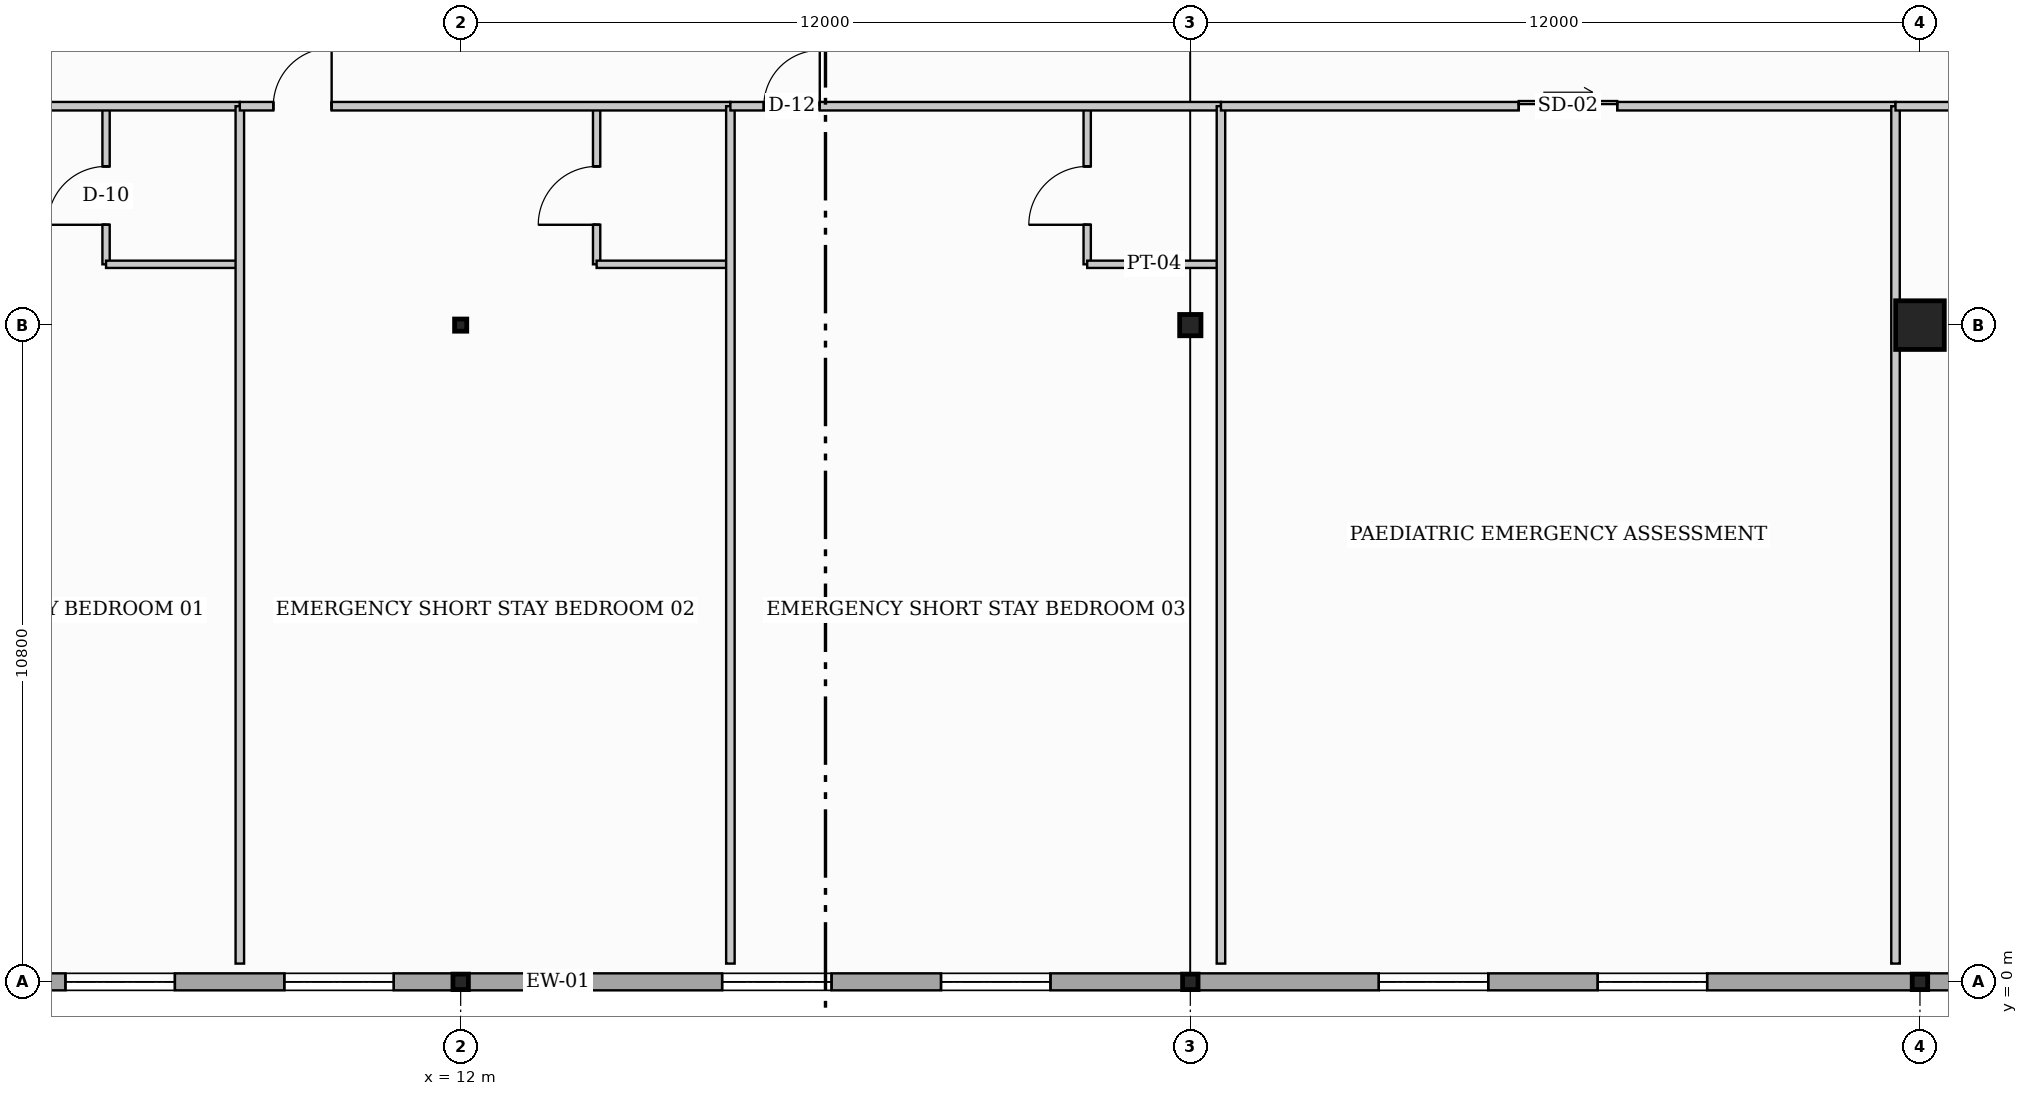
"""IFC4 building model, lengths in metres.
Left out: names, types, materials, properties, quantities, classifications, styles, units other than length and angle.
Written with IfcOpenShell. Run it as: python <this file> out.ifc"""

import sys

from ifc_helpers import new_model, si_unit, direction, frame, frame_2d, origin, origin_2d, place, context, subcontext, project, spatial, rectangle, hollow_rectangle, i_section, extrude, element, fill, save


model = new_model("IFC4")
c1 = context("Model", 3, precision=1e-05, world=origin(), true_north=direction((0.0, 1.0)))
c2 = subcontext(c1, "Body", "Model", "MODEL_VIEW")
j1 = project(units=[si_unit("LENGTHUNIT", "METRE"), si_unit("PLANEANGLEUNIT", "RADIAN")], contexts=[c1])
p1 = place(None, origin())
s1 = spatial("IfcSite", under=j1, at=p1, CompositionType="ELEMENT")
p2 = place(p1, origin())
s2 = spatial("IfcBuilding", under=s1, at=p2, CompositionType="ELEMENT")
p3 = place(p2, origin())
s3 = spatial("IfcBuildingStorey", under=s2, at=p3, CompositionType="ELEMENT", Elevation=0.0)
p4 = place(p3, frame((12.0, 0.0, 0.0), z_axis=(0.0, 0.0, 1.0), x_axis=(0.0, 1.0, 0.0)))
e1 = element("IfcColumn", 1, at=p4, inside=s3, PredefinedType="COLUMN", context=c2, shape_type="SweptSolid", body=[
    extrude(i_section(OverallWidth=0.254, OverallDepth=0.254, WebThickness=0.009, FlangeThickness=0.014, at=origin_2d()), origin(), (0.0, 0.0, 1.0), 4.8),
])
p5 = place(p3, frame((12.0, 10.8, 0.0), z_axis=(0.0, 0.0, 1.0), x_axis=(0.0, 1.0, 0.0)))
e2 = element("IfcColumn", 2, at=p5, inside=s3, PredefinedType="COLUMN", context=c2, shape_type="SweptSolid", body=[
    extrude(hollow_rectangle(XDim=0.2, YDim=0.2, WallThickness=0.01, at=origin_2d()), origin(), (0.0, 0.0, 1.0), 4.8),
])
p6 = place(p3, frame((24.0, 0.0, 0.0), z_axis=(0.0, 0.0, 1.0), x_axis=(1.0, 0.0, 0.0)))
e3 = element("IfcColumn", 3, at=p6, inside=s3, PredefinedType="COLUMN", context=c2, shape_type="SweptSolid", body=[
    extrude(i_section(OverallWidth=0.254, OverallDepth=0.254, WebThickness=0.009, FlangeThickness=0.014, at=origin_2d()), origin(), (0.0, 0.0, 1.0), 4.8),
])
p7 = place(p3, frame((24.0, 10.8, 0.0), z_axis=(0.0, 0.0, 1.0), x_axis=(1.0, 0.0, 0.0)))
e4 = element("IfcColumn", 4, at=p7, inside=s3, PredefinedType="COLUMN", context=c2, shape_type="SweptSolid", body=[
    extrude(i_section(OverallWidth=0.35, OverallDepth=0.35, WebThickness=0.014, FlangeThickness=0.024, at=origin_2d()), origin(), (0.0, 0.0, 1.0), 4.8),
])
p8 = place(p3, frame((36.0, 0.0, 0.0), z_axis=(0.0, 0.0, 1.0), x_axis=(0.0, 1.0, 0.0)))
e5 = element("IfcColumn", 5, at=p8, inside=s3, PredefinedType="COLUMN", context=c2, shape_type="SweptSolid", body=[
    extrude(i_section(OverallWidth=0.254, OverallDepth=0.254, WebThickness=0.009, FlangeThickness=0.014, at=origin_2d()), origin(), (0.0, 0.0, 1.0), 4.8),
])
p9 = place(p3, frame((36.0, 10.8, 0.0), z_axis=(0.0, 0.0, 1.0), x_axis=(0.0, 1.0, 0.0)))
e6 = element("IfcColumn", 6, at=p9, inside=s3, PredefinedType="COLUMN", context=c2, shape_type="SweptSolid", body=[
    extrude(rectangle(XDim=0.8, YDim=0.8, at=origin_2d()), origin(), (0.0, 0.0, 1.0), 4.8),
])
p10 = place(p3, frame((48.0, 0.0, 0.0), z_axis=(0.0, 0.0, 1.0), x_axis=(-1.0, 0.0, 0.0)))
e7 = element("IfcWall", 7, at=p10, inside=s3, PredefinedType="STANDARD", context=c2, shape_type="SweptSolid", body=[
    extrude(rectangle(XDim=48.0, YDim=0.28, at=frame_2d((24.0, 0.0))), origin(), (0.0, 0.0, 1.0), 3.828),
])
p11 = place(p10, frame((1.1, 0.0, 0.95)))
e8 = element("IfcOpeningElement", 8, at=p11, cuts=e7, PredefinedType="OPENING", context=c2, shape_type="SweptSolid", body=[
    extrude(rectangle(XDim=1.8, YDim=0.9, at=frame_2d((0.9, 0.45))), frame((0.0, 0.15, 0.0), z_axis=(0.0, -1.0, 0.0), x_axis=(1.0, 0.0, 0.0)), (0.0, 0.0, 1.0), 0.3),
])
p12 = place(p10, frame((4.7, 0.0, 0.95)))
e9 = element("IfcOpeningElement", 9, at=p12, cuts=e7, PredefinedType="OPENING", context=c2, shape_type="SweptSolid", body=[
    extrude(rectangle(XDim=1.8, YDim=0.9, at=frame_2d((0.9, 0.45))), frame((0.0, 0.15, 0.0), z_axis=(0.0, -1.0, 0.0), x_axis=(1.0, 0.0, 0.0)), (0.0, 0.0, 1.0), 0.3),
])
p13 = place(p10, frame((8.3, 0.0, 0.95)))
e10 = element("IfcOpeningElement", 10, at=p13, cuts=e7, PredefinedType="OPENING", context=c2, shape_type="SweptSolid", body=[
    extrude(rectangle(XDim=1.8, YDim=0.9, at=frame_2d((0.9, 0.45))), frame((0.0, 0.15, 0.0), z_axis=(0.0, -1.0, 0.0), x_axis=(1.0, 0.0, 0.0)), (0.0, 0.0, 1.0), 0.3),
])
p14 = place(p10, frame((15.5, 0.0, 0.95)))
e11 = element("IfcOpeningElement", 11, at=p14, cuts=e7, PredefinedType="OPENING", context=c2, shape_type="SweptSolid", body=[
    extrude(rectangle(XDim=1.8, YDim=0.9, at=frame_2d((0.9, 0.45))), frame((0.0, 0.15, 0.0), z_axis=(0.0, -1.0, 0.0), x_axis=(1.0, 0.0, 0.0)), (0.0, 0.0, 1.0), 0.3),
])
p15 = place(p10, frame((19.1, 0.0, 0.95)))
e12 = element("IfcOpeningElement", 12, at=p15, cuts=e7, PredefinedType="OPENING", context=c2, shape_type="SweptSolid", body=[
    extrude(rectangle(XDim=1.8, YDim=0.9, at=frame_2d((0.9, 0.45))), frame((0.0, 0.15, 0.0), z_axis=(0.0, -1.0, 0.0), x_axis=(1.0, 0.0, 0.0)), (0.0, 0.0, 1.0), 0.3),
])
p16 = place(p10, frame((26.3, 0.0, 0.95)))
e13 = element("IfcOpeningElement", 13, at=p16, cuts=e7, PredefinedType="OPENING", context=c2, shape_type="SweptSolid", body=[
    extrude(rectangle(XDim=1.8, YDim=0.9, at=frame_2d((0.9, 0.45))), frame((0.0, 0.15, 0.0), z_axis=(0.0, -1.0, 0.0), x_axis=(1.0, 0.0, 0.0)), (0.0, 0.0, 1.0), 0.3),
])
p17 = place(p10, frame((29.9, 0.0, 0.95)))
e14 = element("IfcOpeningElement", 14, at=p17, cuts=e7, PredefinedType="OPENING", context=c2, shape_type="SweptSolid", body=[
    extrude(rectangle(XDim=1.8, YDim=0.9, at=frame_2d((0.9, 0.45))), frame((0.0, 0.15, 0.0), z_axis=(0.0, -1.0, 0.0), x_axis=(1.0, 0.0, 0.0)), (0.0, 0.0, 1.0), 0.3),
])
p18 = place(p10, frame((37.1, 0.0, 0.95)))
e15 = element("IfcOpeningElement", 15, at=p18, cuts=e7, PredefinedType="OPENING", context=c2, shape_type="SweptSolid", body=[
    extrude(rectangle(XDim=1.8, YDim=0.9, at=frame_2d((0.9, 0.45))), frame((0.0, 0.15, 0.0), z_axis=(0.0, -1.0, 0.0), x_axis=(1.0, 0.0, 0.0)), (0.0, 0.0, 1.0), 0.3),
])
p19 = place(p10, frame((40.7, 0.0, 0.95)))
e16 = element("IfcOpeningElement", 16, at=p19, cuts=e7, PredefinedType="OPENING", context=c2, shape_type="SweptSolid", body=[
    extrude(rectangle(XDim=1.8, YDim=0.9, at=frame_2d((0.9, 0.45))), frame((0.0, 0.15, 0.0), z_axis=(0.0, -1.0, 0.0), x_axis=(1.0, 0.0, 0.0)), (0.0, 0.0, 1.0), 0.3),
])
p20 = place(p10, frame((44.3, 0.0, 0.95)))
e17 = element("IfcOpeningElement", 17, at=p20, cuts=e7, PredefinedType="OPENING", context=c2, shape_type="SweptSolid", body=[
    extrude(rectangle(XDim=1.8, YDim=0.9, at=frame_2d((0.9, 0.45))), frame((0.0, 0.15, 0.0), z_axis=(0.0, -1.0, 0.0), x_axis=(1.0, 0.0, 0.0)), (0.0, 0.0, 1.0), 0.3),
])
p21 = place(p3, frame((6.168, 11.8, 0.0), z_axis=(0.0, 0.0, 1.0), x_axis=(0.0, 1.0, 0.0)))
e18 = element("IfcWall", 18, at=p21, inside=s3, PredefinedType="PARTITIONING", context=c2, shape_type="SweptSolid", body=[
    extrude(rectangle(XDim=2.6, YDim=0.12, at=frame_2d((1.3, 0.0))), origin(), (0.0, 0.0, 1.0), 4.071),
])
p22 = place(p21, frame((0.65, 0.0, 0.0)))
e19 = element("IfcOpeningElement", 19, at=p22, cuts=e18, PredefinedType="OPENING", context=c2, shape_type="SweptSolid", body=[
    extrude(rectangle(XDim=0.96, YDim=2.06, at=frame_2d((0.48, 1.03))), frame((0.0, 0.07, 0.0), z_axis=(0.0, -1.0, 0.0), x_axis=(1.0, 0.0, 0.0)), (0.0, 0.0, 1.0), 0.14),
])
p23 = place(p3, frame((6.168, 11.8, 0.0), z_axis=(0.0, 0.0, 1.0), x_axis=(1.0, 0.0, 0.0)))
e20 = element("IfcWall", 20, at=p23, inside=s3, PredefinedType="PARTITIONING", context=c2, shape_type="SweptSolid", body=[
    extrude(rectangle(XDim=2.2, YDim=0.12, at=frame_2d((1.1, 0.0))), origin(), (0.0, 0.0, 1.0), 4.445),
])
p24 = place(p3, frame((0.3, 14.4, 0.0), z_axis=(0.0, 0.0, 1.0), x_axis=(1.0, 0.0, 0.0)))
e21 = element("IfcWall", 21, at=p24, inside=s3, PredefinedType="PARTITIONING", context=c2, shape_type="SweptSolid", body=[
    extrude(rectangle(XDim=8.068, YDim=0.14, at=frame_2d((4.034, 0.0))), origin(), (0.0, 0.0, 1.0), 4.027),
])
p25 = place(p24, frame((0.55, 0.0, 0.0)))
e22 = element("IfcOpeningElement", 22, at=p25, cuts=e21, PredefinedType="OPENING", context=c2, shape_type="SweptSolid", body=[
    extrude(rectangle(XDim=1.06, YDim=2.1, at=frame_2d((0.53, 1.05))), frame((0.0, 0.08, 0.0), z_axis=(0.0, -1.0, 0.0), x_axis=(1.0, 0.0, 0.0)), (0.0, 0.0, 1.0), 0.16),
])
p26 = place(p3, frame((8.368, 0.3, 0.0), z_axis=(0.0, 0.0, 1.0), x_axis=(0.0, 1.0, 0.0)))
e23 = element("IfcWall", 23, at=p26, inside=s3, PredefinedType="PARTITIONING", context=c2, shape_type="SweptSolid", body=[
    extrude(rectangle(XDim=14.1, YDim=0.14, at=frame_2d((7.05, 0.0))), origin(), (0.0, 0.0, 1.0), 3.738),
])
p27 = place(p3, frame((14.236, 11.8, 0.0), z_axis=(0.0, 0.0, 1.0), x_axis=(0.0, 1.0, 0.0)))
e24 = element("IfcWall", 24, at=p27, inside=s3, PredefinedType="PARTITIONING", context=c2, shape_type="SweptSolid", body=[
    extrude(rectangle(XDim=2.6, YDim=0.12, at=frame_2d((1.3, 0.0))), origin(), (0.0, 0.0, 1.0), 4.074),
])
p28 = place(p27, frame((0.65, 0.0, 0.0)))
e25 = element("IfcOpeningElement", 25, at=p28, cuts=e24, PredefinedType="OPENING", context=c2, shape_type="SweptSolid", body=[
    extrude(rectangle(XDim=0.96, YDim=2.06, at=frame_2d((0.48, 1.03))), frame((0.0, 0.07, 0.0), z_axis=(0.0, -1.0, 0.0), x_axis=(1.0, 0.0, 0.0)), (0.0, 0.0, 1.0), 0.14),
])
p29 = place(p3, frame((14.236, 11.8, 0.0), z_axis=(0.0, 0.0, 1.0), x_axis=(1.0, 0.0, 0.0)))
e26 = element("IfcWall", 26, at=p29, inside=s3, PredefinedType="PARTITIONING", context=c2, shape_type="SweptSolid", body=[
    extrude(rectangle(XDim=2.2, YDim=0.12, at=frame_2d((1.1, 0.0))), origin(), (0.0, 0.0, 1.0), 4.445),
])
p30 = place(p3, frame((8.368, 14.4, 0.0), z_axis=(0.0, 0.0, 1.0), x_axis=(1.0, 0.0, 0.0)))
e27 = element("IfcWall", 27, at=p30, inside=s3, PredefinedType="PARTITIONING", context=c2, shape_type="SweptSolid", body=[
    extrude(rectangle(XDim=8.068, YDim=0.14, at=frame_2d((4.034, 0.0))), origin(), (0.0, 0.0, 1.0), 3.897),
])
p31 = place(p30, frame((0.55, 0.0, 0.0)))
e28 = element("IfcOpeningElement", 28, at=p31, cuts=e27, PredefinedType="OPENING", context=c2, shape_type="SweptSolid", body=[
    extrude(rectangle(XDim=0.96, YDim=2.06, at=frame_2d((0.48, 1.03))), frame((0.0, 0.08, 0.0), z_axis=(0.0, -1.0, 0.0), x_axis=(1.0, 0.0, 0.0)), (0.0, 0.0, 1.0), 0.16),
])
p32 = place(p3, frame((16.436, 0.3, 0.0), z_axis=(0.0, 0.0, 1.0), x_axis=(0.0, 1.0, 0.0)))
e29 = element("IfcWall", 29, at=p32, inside=s3, PredefinedType="PARTITIONING", context=c2, shape_type="SweptSolid", body=[
    extrude(rectangle(XDim=14.1, YDim=0.14, at=frame_2d((7.05, 0.0))), origin(), (0.0, 0.0, 1.0), 3.818),
])
p33 = place(p3, frame((22.304, 11.8, 0.0), z_axis=(0.0, 0.0, 1.0), x_axis=(0.0, 1.0, 0.0)))
e30 = element("IfcWall", 30, at=p33, inside=s3, PredefinedType="PARTITIONING", context=c2, shape_type="SweptSolid", body=[
    extrude(rectangle(XDim=2.6, YDim=0.12, at=frame_2d((1.3, 0.0))), origin(), (0.0, 0.0, 1.0), 4.074),
])
p34 = place(p33, frame((0.65, 0.0, 0.0)))
e31 = element("IfcOpeningElement", 31, at=p34, cuts=e30, PredefinedType="OPENING", context=c2, shape_type="SweptSolid", body=[
    extrude(rectangle(XDim=0.96, YDim=2.06, at=frame_2d((0.48, 1.03))), frame((0.0, 0.07, 0.0), z_axis=(0.0, -1.0, 0.0), x_axis=(1.0, 0.0, 0.0)), (0.0, 0.0, 1.0), 0.14),
])
p35 = place(p3, frame((22.304, 11.8, 0.0), z_axis=(0.0, 0.0, 1.0), x_axis=(1.0, 0.0, 0.0)))
e32 = element("IfcWall", 32, at=p35, inside=s3, PredefinedType="PARTITIONING", context=c2, shape_type="SweptSolid", body=[
    extrude(rectangle(XDim=2.2, YDim=0.12, at=frame_2d((1.1, 0.0))), origin(), (0.0, 0.0, 1.0), 3.902),
])
p36 = place(p3, frame((16.436, 14.4, 0.0), z_axis=(0.0, 0.0, 1.0), x_axis=(1.0, 0.0, 0.0)))
e33 = element("IfcWall", 33, at=p36, inside=s3, PredefinedType="PARTITIONING", context=c2, shape_type="SweptSolid", body=[
    extrude(rectangle(XDim=8.068, YDim=0.14, at=frame_2d((4.034, 0.0))), origin(), (0.0, 0.0, 1.0), 3.902),
])
p37 = place(p36, frame((0.55, 0.0, 0.0)))
e34 = element("IfcOpeningElement", 34, at=p37, cuts=e33, PredefinedType="OPENING", context=c2, shape_type="SweptSolid", body=[
    extrude(rectangle(XDim=0.92, YDim=2.04, at=frame_2d((0.46, 1.02))), frame((0.0, 0.08, 0.0), z_axis=(0.0, -1.0, 0.0), x_axis=(1.0, 0.0, 0.0)), (0.0, 0.0, 1.0), 0.16),
])
p38 = place(p3, frame((24.504, 0.3, 0.0), z_axis=(0.0, 0.0, 1.0), x_axis=(0.0, 1.0, 0.0)))
e35 = element("IfcWall", 35, at=p38, inside=s3, PredefinedType="PARTITIONING", context=c2, shape_type="SweptSolid", body=[
    extrude(rectangle(XDim=14.1, YDim=0.14, at=frame_2d((7.05, 0.0))), origin(), (0.0, 0.0, 1.0), 3.823),
])
p39 = place(p3, frame((24.504, 14.4, 0.0), z_axis=(0.0, 0.0, 1.0), x_axis=(1.0, 0.0, 0.0)))
e36 = element("IfcWall", 36, at=p39, inside=s3, PredefinedType="PARTITIONING", context=c2, shape_type="SweptSolid", body=[
    extrude(rectangle(XDim=11.094, YDim=0.14, at=frame_2d((5.547, 0.0))), origin(), (0.0, 0.0, 1.0), 4.123),
])
p40 = place(p39, frame((4.897, 0.0, 0.0)))
e37 = element("IfcOpeningElement", 37, at=p40, cuts=e36, PredefinedType="OPENING", context=c2, shape_type="SweptSolid", body=[
    extrude(rectangle(XDim=1.62, YDim=2.3, at=frame_2d((0.81, 1.15))), frame((0.0, 0.08, 0.0), z_axis=(0.0, -1.0, 0.0), x_axis=(1.0, 0.0, 0.0)), (0.0, 0.0, 1.0), 0.16),
])
p41 = place(p3, frame((35.598, 0.3, 0.0), z_axis=(0.0, 0.0, 1.0), x_axis=(0.0, 1.0, 0.0)))
e38 = element("IfcWall", 38, at=p41, inside=s3, PredefinedType="PARTITIONING", context=c2, shape_type="SweptSolid", body=[
    extrude(rectangle(XDim=14.1, YDim=0.14, at=frame_2d((7.05, 0.0))), origin(), (0.0, 0.0, 1.0), 3.823),
])
p42 = place(p3, frame((35.598, 14.4, 0.0), z_axis=(0.0, 0.0, 1.0), x_axis=(1.0, 0.0, 0.0)))
e39 = element("IfcWall", 39, at=p42, inside=s3, PredefinedType="PARTITIONING", context=c2, shape_type="SweptSolid", body=[
    extrude(rectangle(XDim=5.042, YDim=0.14, at=frame_2d((2.521, 0.0))), origin(), (0.0, 0.0, 1.0), 3.97),
])
p43 = place(p42, frame((1.871, 0.0, 0.0)))
e40 = element("IfcOpeningElement", 40, at=p43, cuts=e39, PredefinedType="OPENING", context=c2, shape_type="SweptSolid", body=[
    extrude(rectangle(XDim=1.48, YDim=2.26, at=frame_2d((0.74, 1.13))), frame((0.0, 0.08, 0.0), z_axis=(0.0, -1.0, 0.0), x_axis=(1.0, 0.0, 0.0)), (0.0, 0.0, 1.0), 0.16),
])
p44 = place(p14, origin())
e41 = element("IfcWindow", 41, at=p44, inside=s3, PartitioningType="DOUBLE_PANEL_HORIZONTAL", PredefinedType="WINDOW", context=c2, shape_type="SweptSolid", body=[
    extrude(rectangle(XDim=1.8, YDim=0.9, at=frame_2d((0.9, 0.45))), frame((0.0, 0.03, 0.0), z_axis=(0.0, -1.0, 0.0), x_axis=(1.0, 0.0, 0.0)), (0.0, 0.0, 1.0), 0.06),
])
fill(e11, e41)
p45 = place(p15, origin())
e42 = element("IfcWindow", 42, at=p45, inside=s3, PartitioningType="DOUBLE_PANEL_HORIZONTAL", PredefinedType="WINDOW", context=c2, shape_type="SweptSolid", body=[
    extrude(rectangle(XDim=1.8, YDim=0.9, at=frame_2d((0.9, 0.45))), frame((0.0, 0.03, 0.0), z_axis=(0.0, -1.0, 0.0), x_axis=(1.0, 0.0, 0.0)), (0.0, 0.0, 1.0), 0.06),
])
fill(e12, e42)
p46 = place(p16, origin())
e43 = element("IfcWindow", 43, at=p46, inside=s3, PartitioningType="DOUBLE_PANEL_HORIZONTAL", PredefinedType="WINDOW", context=c2, shape_type="SweptSolid", body=[
    extrude(rectangle(XDim=1.8, YDim=0.9, at=frame_2d((0.9, 0.45))), frame((0.0, 0.03, 0.0), z_axis=(0.0, -1.0, 0.0), x_axis=(1.0, 0.0, 0.0)), (0.0, 0.0, 1.0), 0.06),
])
fill(e13, e43)
p47 = place(p17, origin())
e44 = element("IfcWindow", 44, at=p47, inside=s3, PartitioningType="DOUBLE_PANEL_HORIZONTAL", PredefinedType="WINDOW", context=c2, shape_type="SweptSolid", body=[
    extrude(rectangle(XDim=1.8, YDim=0.9, at=frame_2d((0.9, 0.45))), frame((0.0, 0.03, 0.0), z_axis=(0.0, -1.0, 0.0), x_axis=(1.0, 0.0, 0.0)), (0.0, 0.0, 1.0), 0.06),
])
fill(e14, e44)
p48 = place(p18, origin())
e45 = element("IfcWindow", 45, at=p48, inside=s3, PartitioningType="DOUBLE_PANEL_HORIZONTAL", PredefinedType="WINDOW", context=c2, shape_type="SweptSolid", body=[
    extrude(rectangle(XDim=1.8, YDim=0.9, at=frame_2d((0.9, 0.45))), frame((0.0, 0.03, 0.0), z_axis=(0.0, -1.0, 0.0), x_axis=(1.0, 0.0, 0.0)), (0.0, 0.0, 1.0), 0.06),
])
fill(e15, e45)
p49 = place(p19, origin())
e46 = element("IfcWindow", 46, at=p49, inside=s3, PartitioningType="DOUBLE_PANEL_HORIZONTAL", PredefinedType="WINDOW", context=c2, shape_type="SweptSolid", body=[
    extrude(rectangle(XDim=1.8, YDim=0.9, at=frame_2d((0.9, 0.45))), frame((0.0, 0.03, 0.0), z_axis=(0.0, -1.0, 0.0), x_axis=(1.0, 0.0, 0.0)), (0.0, 0.0, 1.0), 0.06),
])
fill(e16, e46)
p50 = place(p22, origin())
e47 = element("IfcDoor", 47, at=p50, inside=s3, OperationType="SINGLE_SWING_LEFT", PredefinedType="DOOR", context=c2, shape_type="SweptSolid", body=[
    extrude(rectangle(XDim=0.96, YDim=2.06, at=frame_2d((0.48, 1.03))), frame((0.0, 0.025, 0.0), z_axis=(0.0, -1.0, 0.0), x_axis=(1.0, 0.0, 0.0)), (0.0, 0.0, 1.0), 0.05),
])
fill(e19, e47)
p51 = place(p28, origin())
e48 = element("IfcDoor", 48, at=p51, inside=s3, OperationType="SINGLE_SWING_LEFT", PredefinedType="DOOR", context=c2, shape_type="SweptSolid", body=[
    extrude(rectangle(XDim=0.96, YDim=2.06, at=frame_2d((0.48, 1.03))), frame((0.0, 0.025, 0.0), z_axis=(0.0, -1.0, 0.0), x_axis=(1.0, 0.0, 0.0)), (0.0, 0.0, 1.0), 0.05),
])
fill(e25, e48)
p52 = place(p31, origin())
e49 = element("IfcDoor", 49, at=p52, inside=s3, OperationType="SINGLE_SWING_RIGHT", PredefinedType="DOOR", context=c2, shape_type="SweptSolid", body=[
    extrude(rectangle(XDim=0.96, YDim=2.06, at=frame_2d((0.48, 1.03))), frame((0.0, 0.025, 0.0), z_axis=(0.0, -1.0, 0.0), x_axis=(1.0, 0.0, 0.0)), (0.0, 0.0, 1.0), 0.05),
])
fill(e28, e49)
p53 = place(p34, origin())
e50 = element("IfcDoor", 50, at=p53, inside=s3, OperationType="SINGLE_SWING_LEFT", PredefinedType="DOOR", context=c2, shape_type="SweptSolid", body=[
    extrude(rectangle(XDim=0.96, YDim=2.06, at=frame_2d((0.48, 1.03))), frame((0.0, 0.025, 0.0), z_axis=(0.0, -1.0, 0.0), x_axis=(1.0, 0.0, 0.0)), (0.0, 0.0, 1.0), 0.05),
])
fill(e31, e50)
p54 = place(p37, origin())
e51 = element("IfcDoor", 51, at=p54, inside=s3, OperationType="SINGLE_SWING_RIGHT", PredefinedType="DOOR", context=c2, shape_type="SweptSolid", body=[
    extrude(rectangle(XDim=0.92, YDim=2.04, at=frame_2d((0.46, 1.02))), frame((0.0, 0.025, 0.0), z_axis=(0.0, -1.0, 0.0), x_axis=(1.0, 0.0, 0.0)), (0.0, 0.0, 1.0), 0.05),
])
fill(e34, e51)
p55 = place(p40, origin())
e52 = element("IfcDoor", 52, at=p55, inside=s3, OperationType="SLIDING_TO_RIGHT", PredefinedType="DOOR", context=c2, shape_type="SweptSolid", body=[
    extrude(rectangle(XDim=1.62, YDim=2.3, at=frame_2d((0.81, 1.15))), frame((0.0, 0.025, 0.0), z_axis=(0.0, -1.0, 0.0), x_axis=(1.0, 0.0, 0.0)), (0.0, 0.0, 1.0), 0.05),
])
fill(e37, e52)
save(model, sys.argv[1])
